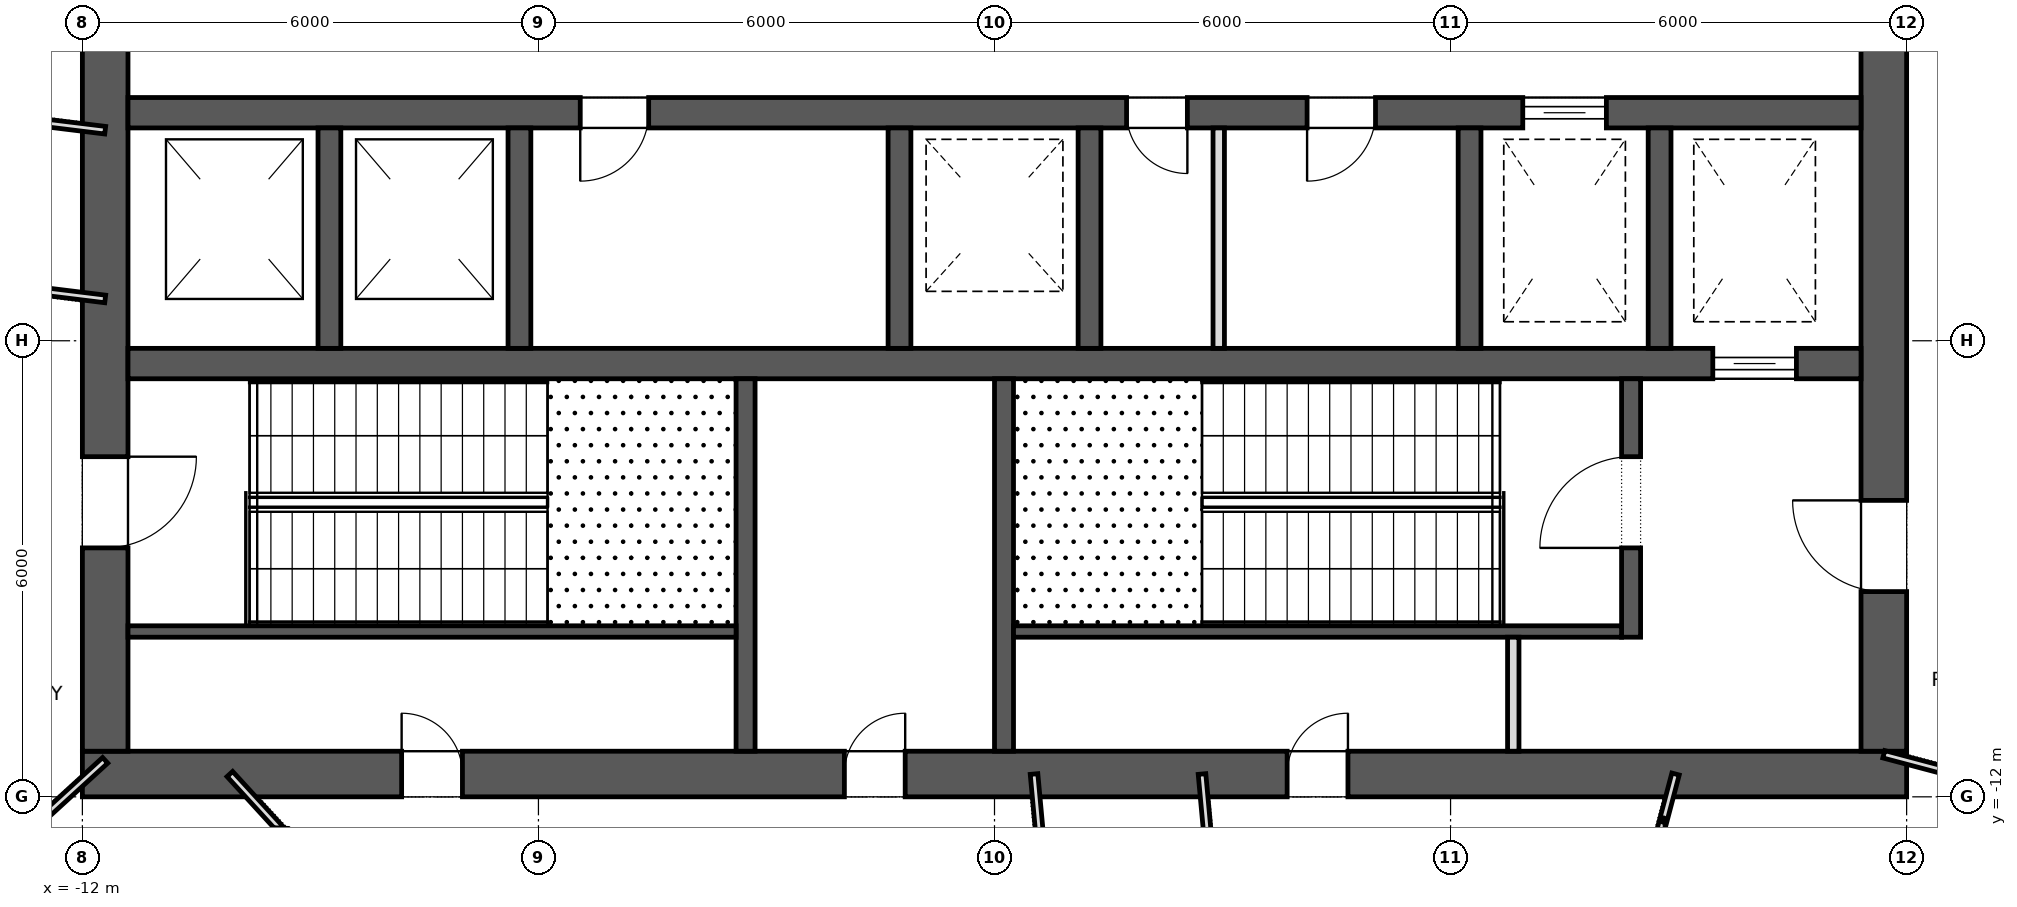
"""IFC4 building model, lengths in metres.
Left out: names, types, materials, properties, quantities, classifications, styles, units other than length and angle.
Written with IfcOpenShell. Run it as: python <this file> out.ifc"""

import sys

from ifc_helpers import new_model, si_unit, direction, frame, frame_2d, origin, place, context, subcontext, project, spatial, polyline, rectangle, outline, extrude, element, fill, save


model = new_model("IFC4")
c1 = context("Model", 3, precision=1e-05, world=origin(), true_north=direction((0.0, 1.0)))
c2 = subcontext(c1, "Body", "Model", "MODEL_VIEW")
j1 = project(units=[si_unit("LENGTHUNIT", "METRE"), si_unit("PLANEANGLEUNIT", "RADIAN")], contexts=[c1])
p1 = place(None, origin())
s1 = spatial("IfcSite", under=j1, at=p1, CompositionType="ELEMENT")
p2 = place(p1, origin())
s2 = spatial("IfcBuilding", under=s1, at=p2, CompositionType="ELEMENT")
p3 = place(p2, frame((0.0, 0.0, 328.3)))
s3 = spatial("IfcBuildingStorey", under=s2, at=p3, CompositionType="ELEMENT", Elevation=328.3)
p4 = place(p3, frame((-12.0, -11.7, 0.0), z_axis=(0.0, 0.0, 1.0), x_axis=(1.0, 0.0, 0.0)))
e1 = element("IfcWall", 1, at=p4, inside=s3, PredefinedType="SHEAR", context=c2, shape_type="SweptSolid", body=[
    extrude(rectangle(XDim=24.0, YDim=0.6, at=frame_2d((12.0, 0.0))), origin(), (0.0, 0.0, 1.0), 5.0),
])
p5 = place(p4, frame((10.025, 0.0, 0.0)))
e2 = element("IfcOpeningElement", 2, at=p5, cuts=e1, PredefinedType="OPENING", context=c2, shape_type="SweptSolid", body=[
    extrude(rectangle(XDim=0.8, YDim=2.1, at=frame_2d((0.4, 1.05))), frame((0.0, 0.312, 0.0), z_axis=(0.0, -1.0, 0.0), x_axis=(1.0, 0.0, 0.0)), (0.0, 0.0, 1.0), 0.624),
])
p6 = place(p4, frame((4.2, 0.0, 0.0)))
e3 = element("IfcOpeningElement", 3, at=p6, cuts=e1, PredefinedType="OPENING", context=c2, shape_type="SweptSolid", body=[
    extrude(rectangle(XDim=0.8, YDim=2.1, at=frame_2d((0.4, 1.05))), frame((0.0, 0.312, 0.0), z_axis=(0.0, -1.0, 0.0), x_axis=(1.0, 0.0, 0.0)), (0.0, 0.0, 1.0), 0.624),
])
p7 = place(p4, frame((15.85, 0.0, 0.0)))
e4 = element("IfcOpeningElement", 4, at=p7, cuts=e1, PredefinedType="OPENING", context=c2, shape_type="SweptSolid", body=[
    extrude(rectangle(XDim=0.8, YDim=2.1, at=frame_2d((0.4, 1.05))), frame((0.0, 0.312, 0.0), z_axis=(0.0, -1.0, 0.0), x_axis=(1.0, 0.0, 0.0)), (0.0, 0.0, 1.0), 0.624),
])
p8 = place(p3, frame((11.7, -11.4, 0.0), z_axis=(0.0, 0.0, 1.0), x_axis=(0.0, 1.0, 0.0)))
e5 = element("IfcWall", 5, at=p8, inside=s3, PredefinedType="SHEAR", context=c2, shape_type="SweptSolid", body=[
    extrude(rectangle(XDim=22.8, YDim=0.6, at=frame_2d((11.4, 0.0))), origin(), (0.0, 0.0, 1.0), 5.0),
])
p9 = place(p8, frame((10.2, 0.0, 0.0)))
e6 = element("IfcOpeningElement", 6, at=p9, cuts=e5, PredefinedType="OPENING", context=c2, shape_type="SweptSolid", body=[
    extrude(rectangle(XDim=2.4, YDim=2.1, at=frame_2d((1.2, 1.05))), frame((0.0, 0.312, 0.0), z_axis=(0.0, -1.0, 0.0), x_axis=(1.0, 0.0, 0.0)), (0.0, 0.0, 1.0), 0.624),
])
p10 = place(p8, frame((19.5, 0.0, 0.0)))
e7 = element("IfcOpeningElement", 7, at=p10, cuts=e5, PredefinedType="OPENING", context=c2, shape_type="SweptSolid", body=[
    extrude(rectangle(XDim=1.2, YDim=2.1, at=frame_2d((0.6, 1.05))), frame((0.0, 0.312, 0.0), z_axis=(0.0, -1.0, 0.0), x_axis=(1.0, 0.0, 0.0)), (0.0, 0.0, 1.0), 0.624),
])
p11 = place(p8, frame((2.1, 0.0, 0.0)))
e8 = element("IfcOpeningElement", 8, at=p11, cuts=e5, PredefinedType="OPENING", context=c2, shape_type="SweptSolid", body=[
    extrude(rectangle(XDim=1.2, YDim=2.1, at=frame_2d((0.6, 1.05))), frame((0.0, 0.312, 0.0), z_axis=(0.0, -1.0, 0.0), x_axis=(1.0, 0.0, 0.0)), (0.0, 0.0, 1.0), 0.624),
])
p12 = place(p3, frame((-11.7, -11.4, 0.0), z_axis=(0.0, 0.0, 1.0), x_axis=(0.0, 1.0, 0.0)))
e9 = element("IfcWall", 9, at=p12, inside=s3, PredefinedType="SHEAR", context=c2, shape_type="SweptSolid", body=[
    extrude(rectangle(XDim=22.8, YDim=0.6, at=frame_2d((11.4, 0.0))), origin(), (0.0, 0.0, 1.0), 5.0),
])
p13 = place(p12, frame((10.2, 0.0, 0.0)))
e10 = element("IfcOpeningElement", 10, at=p13, cuts=e9, PredefinedType="OPENING", context=c2, shape_type="SweptSolid", body=[
    extrude(rectangle(XDim=2.4, YDim=2.1, at=frame_2d((1.2, 1.05))), frame((0.0, 0.312, 0.0), z_axis=(0.0, -1.0, 0.0), x_axis=(1.0, 0.0, 0.0)), (0.0, 0.0, 1.0), 0.624),
])
p14 = place(p12, frame((18.925, 0.0, 0.0)))
e11 = element("IfcOpeningElement", 11, at=p14, cuts=e9, PredefinedType="OPENING", context=c2, shape_type="SweptSolid", body=[
    extrude(rectangle(XDim=1.2, YDim=2.1, at=frame_2d((0.6, 1.05))), frame((0.0, 0.312, 0.0), z_axis=(0.0, -1.0, 0.0), x_axis=(1.0, 0.0, 0.0)), (0.0, 0.0, 1.0), 0.624),
])
p15 = place(p12, frame((2.675, 0.0, 0.0)))
e12 = element("IfcOpeningElement", 12, at=p15, cuts=e9, PredefinedType="OPENING", context=c2, shape_type="SweptSolid", body=[
    extrude(rectangle(XDim=1.2, YDim=2.1, at=frame_2d((0.6, 1.05))), frame((0.0, 0.312, 0.0), z_axis=(0.0, -1.0, 0.0), x_axis=(1.0, 0.0, 0.0)), (0.0, 0.0, 1.0), 0.624),
])
p16 = place(p3, frame((-11.4, -3.0, 0.0), z_axis=(0.0, 0.0, 1.0), x_axis=(1.0, 0.0, 0.0)))
e13 = element("IfcWall", 13, at=p16, inside=s3, PredefinedType="SHEAR", context=c2, shape_type="SweptSolid", body=[
    extrude(rectangle(XDim=22.8, YDim=0.4, at=frame_2d((11.4, 0.0))), origin(), (0.0, 0.0, 1.0), 5.0),
])
p17 = place(p16, frame((18.35, 0.0, 0.0)))
e14 = element("IfcOpeningElement", 14, at=p17, cuts=e13, PredefinedType="OPENING", context=c2, shape_type="SweptSolid", body=[
    extrude(rectangle(XDim=1.1, YDim=2.1, at=frame_2d((0.55, 1.05))), frame((0.0, 0.212, 0.0), z_axis=(0.0, -1.0, 0.0), x_axis=(1.0, 0.0, 0.0)), (0.0, 0.0, 1.0), 0.424),
])
p18 = place(p16, frame((13.137, 0.0, 0.0)))
e15 = element("IfcOpeningElement", 15, at=p18, cuts=e13, PredefinedType="OPENING", context=c2, shape_type="SweptSolid", body=[
    extrude(rectangle(XDim=0.8, YDim=2.1, at=frame_2d((0.4, 1.05))), frame((0.0, 0.212, 0.0), z_axis=(0.0, -1.0, 0.0), x_axis=(1.0, 0.0, 0.0)), (0.0, 0.0, 1.0), 0.424),
])
p19 = place(p16, frame((15.512, 0.0, 0.0)))
e16 = element("IfcOpeningElement", 16, at=p19, cuts=e13, PredefinedType="OPENING", context=c2, shape_type="SweptSolid", body=[
    extrude(rectangle(XDim=0.9, YDim=2.1, at=frame_2d((0.45, 1.05))), frame((0.0, 0.212, 0.0), z_axis=(0.0, -1.0, 0.0), x_axis=(1.0, 0.0, 0.0)), (0.0, 0.0, 1.0), 0.424),
])
p20 = place(p16, frame((5.95, 0.0, 0.0)))
e17 = element("IfcOpeningElement", 17, at=p20, cuts=e13, PredefinedType="OPENING", context=c2, shape_type="SweptSolid", body=[
    extrude(rectangle(XDim=0.9, YDim=2.1, at=frame_2d((0.45, 1.05))), frame((0.0, 0.212, 0.0), z_axis=(0.0, -1.0, 0.0), x_axis=(1.0, 0.0, 0.0)), (0.0, 0.0, 1.0), 0.424),
])
p21 = place(p3, frame((-11.4, -6.3, 0.0), z_axis=(0.0, 0.0, 1.0), x_axis=(1.0, 0.0, 0.0)))
e18 = element("IfcWall", 18, at=p21, inside=s3, PredefinedType="SHEAR", context=c2, shape_type="SweptSolid", body=[
    extrude(rectangle(XDim=22.8, YDim=0.4, at=frame_2d((11.4, 0.0))), origin(), (0.0, 0.0, 1.0), 5.0),
])
p22 = place(p21, frame((20.85, 0.0, 0.0)))
e19 = element("IfcOpeningElement", 19, at=p22, cuts=e18, PredefinedType="OPENING", context=c2, shape_type="SweptSolid", body=[
    extrude(rectangle(XDim=1.1, YDim=2.1, at=frame_2d((0.55, 1.05))), frame((0.0, 0.212, 0.0), z_axis=(0.0, -1.0, 0.0), x_axis=(1.0, 0.0, 0.0)), (0.0, 0.0, 1.0), 0.424),
])
for number, where, z_axis, x_axis in (
    (20, (-8.75, -6.1, 0.0), (0.0, 0.0, 1.0), (0.0, 1.0, 0.0)),
    (21, (-6.25, -6.1, 0.0), (0.0, 0.0, 1.0), (0.0, 1.0, 0.0)),
    (22, (-1.25, -6.1, 0.0), (0.0, 0.0, 1.0), (0.0, 1.0, 0.0)),
    (23, (1.25, -6.1, 0.0), (0.0, 0.0, 1.0), (0.0, 1.0, 0.0)),
    (24, (6.25, -6.1, 0.0), (0.0, 0.0, 1.0), (0.0, 1.0, 0.0)),
    (25, (8.75, -6.1, 0.0), (0.0, 0.0, 1.0), (0.0, 1.0, 0.0)),
):
    element("IfcWall", number, at=place(p3, frame(where, z_axis=z_axis, x_axis=x_axis)), inside=s3, PredefinedType="SHEAR", context=c2, shape_type="SweptSolid", body=[
        extrude(rectangle(XDim=2.9, YDim=0.3, at=frame_2d((1.45, 0.0))), origin(), (0.0, 0.0, 1.0), 5.0),
    ])
for number, where, z_axis, x_axis in (
    (26, (-3.275, -11.4, 0.0), (0.0, 0.0, 1.0), (0.0, 1.0, 0.0)),
    (27, (0.125, -11.4, 0.0), (0.0, 0.0, 1.0), (0.0, 1.0, 0.0)),
):
    element("IfcWall", number, at=place(p3, frame(where, z_axis=z_axis, x_axis=x_axis)), inside=s3, PredefinedType="SHEAR", context=c2, shape_type="SweptSolid", body=[
        extrude(rectangle(XDim=4.9, YDim=0.25, at=frame_2d((2.45, 0.0))), origin(), (0.0, 0.0, 1.0), 4.65),
    ])
p23 = place(p3, frame((8.375, -9.9, 0.0), z_axis=(0.0, 0.0, 1.0), x_axis=(0.0, 1.0, 0.0)))
e28 = element("IfcWall", 28, at=p23, inside=s3, PredefinedType="SHEAR", context=c2, shape_type="SweptSolid", body=[
    extrude(rectangle(XDim=3.4, YDim=0.25, at=frame_2d((1.7, 0.0))), origin(), (0.0, 0.0, 1.0), 4.65),
])
p24 = place(p23, frame((1.175, 0.0, 0.0)))
e29 = element("IfcOpeningElement", 29, at=p24, cuts=e28, PredefinedType="OPENING", context=c2, shape_type="SweptSolid", body=[
    extrude(rectangle(XDim=1.2, YDim=2.1, at=frame_2d((0.6, 1.05))), frame((0.0, 0.137, 0.0), z_axis=(0.0, -1.0, 0.0), x_axis=(1.0, 0.0, 0.0)), (0.0, 0.0, 1.0), 0.274),
])
for number, where, z_axis, x_axis in (
    (30, (-11.4, -9.825, 0.0), (0.0, 0.0, 1.0), (1.0, 0.0, 0.0)),
    (31, (0.25, -9.825, 0.0), (0.0, 0.0, 1.0), (1.0, 0.0, 0.0)),
):
    element("IfcWall", number, at=place(p3, frame(where, z_axis=z_axis, x_axis=x_axis)), inside=s3, PredefinedType="SHEAR", context=c2, shape_type="SweptSolid", body=[
        extrude(rectangle(XDim=8.0, YDim=0.15, at=frame_2d((4.0, 0.0))), origin(), (0.0, 0.0, 1.0), 4.65),
    ])
p25 = place(p3, frame((6.825, -11.4, 0.0), z_axis=(0.0, 0.0, 1.0), x_axis=(0.0, 1.0, 0.0)))
e32 = element("IfcWall", 32, at=p25, inside=s3, PredefinedType="PARTITIONING", context=c2, shape_type="SweptSolid", body=[
    extrude(rectangle(XDim=1.5, YDim=0.15, at=frame_2d((0.75, 0.0))), origin(), (0.0, 0.0, 1.0), 4.65),
])
p26 = place(p3, frame((2.95, -6.1, 0.0), z_axis=(0.0, 0.0, 1.0), x_axis=(0.0, 1.0, 0.0)))
e33 = element("IfcWall", 33, at=p26, inside=s3, PredefinedType="PARTITIONING", context=c2, shape_type="SweptSolid", body=[
    extrude(rectangle(XDim=2.9, YDim=0.15, at=frame_2d((1.45, 0.0))), origin(), (0.0, 0.0, 1.0), 4.65),
])
p27 = place(p3, frame((-25.235, -3.784, 0.0), z_axis=(0.0, 0.0, 1.0), x_axis=(0.992511578582, -0.122150588948, 0.0)))
e34 = element("IfcWall", 34, at=p27, inside=s3, PredefinedType="PARTITIONING", context=c2, shape_type="SweptSolid", body=[
    extrude(outline(polyline([(0.063, -0.05), (1.852, -0.05), (3.64, -0.05), (5.429, -0.05), (7.218, -0.05), (9.007, -0.05), (10.795, -0.05), (10.797, -0.05), (10.797, -0.05), (12.217, -0.05), (13.637, -0.05), (13.637, 0.05), (11.689, 0.05), (9.741, 0.05), (7.792, 0.05), (5.844, 0.05), (3.896, 0.05), (1.948, 0.05), (0.0, 0.05), (0.0, 0.049), (0.011, 0.017), (0.035, 0.026), (0.063, -0.05)])), origin(), (0.0, 0.0, 1.0), 4.65),
])
p28 = place(p3, frame((-16.898, -16.272, 0.0), z_axis=(0.0, 0.0, 1.0), x_axis=(0.738080105563, 0.674713092931, 0.0)))
e35 = element("IfcWall", 35, at=p28, inside=s3, PredefinedType="PARTITIONING", context=c2, shape_type="SweptSolid", body=[
    extrude(outline(polyline([(7.043, 0.05), (5.152, 0.05), (3.261, 0.05), (3.259, 0.048), (3.257, 0.05), (1.635, 0.05), (0.013, 0.05), (0.018, 0.009), (0.0, 0.007), (0.0, -0.05), (1.761, -0.05), (3.521, -0.05), (5.282, -0.05), (7.043, -0.05), (7.043, 0.05)])), origin(), (0.0, 0.0, 1.0), 4.65),
])
p29 = place(p3, frame((-9.376, -12.447, 0.0), z_axis=(0.0, 0.0, 1.0), x_axis=(-0.67520050009, 0.73763424858, 0.0)))
e36 = element("IfcWall", 36, at=p29, inside=s3, PredefinedType="PARTITIONING", context=c2, shape_type="SweptSolid", body=[
    extrude(outline(polyline([(1.013, 0.05), (0.1, 0.05), (0.0, -0.05), (1.013, -0.05), (1.013, 0.05)])), origin(), (0.0, 0.0, 1.0), 4.65),
])
p30 = place(p3, frame((0.52, -11.7, 0.0), z_axis=(0.0, 0.0, 1.0), x_axis=(0.091437926601, -0.995810777999, 0.0)))
e37 = element("IfcWall", 37, at=p30, inside=s3, PredefinedType="PARTITIONING", context=c2, shape_type="SweptSolid", body=[
    extrude(outline(polyline([(0.0, -0.05), (1.416, -0.05), (2.832, -0.05), (2.833, -0.049), (2.842, -0.05), (4.599, -0.05), (6.357, -0.05), (8.114, -0.05), (9.872, -0.05), (9.877, 0.007), (9.902, 0.005), (9.906, 0.046), (9.906, 0.05), (7.925, 0.05), (5.943, 0.05), (3.962, 0.05), (1.981, 0.05), (0.0, 0.05), (0.0, -0.05)])), origin(), (0.0, 0.0, 1.0), 4.65),
])
p31 = place(p3, frame((2.73, -11.7, 0.0), z_axis=(0.0, 0.0, 1.0), x_axis=(0.091085808065, -0.995843047658, 0.0)))
e38 = element("IfcWall", 38, at=p31, inside=s3, PredefinedType="PARTITIONING", context=c2, shape_type="SweptSolid", body=[
    extrude(outline(polyline([(9.724, -0.05), (9.724, -0.05), (9.721, -0.004), (9.696, -0.006), (9.691, 0.05), (7.753, 0.05), (5.815, 0.05), (3.877, 0.05), (1.938, 0.05), (0.0, 0.05), (0.0, -0.05), (1.945, -0.05), (3.89, -0.05), (5.835, -0.05), (7.78, -0.05), (9.724, -0.05)])), origin(), (0.0, 0.0, 1.0), 4.65),
])
p32 = place(p3, frame((8.96, -11.7, 0.0), z_axis=(0.0, 0.0, 1.0), x_axis=(-0.255665703413, -0.966765249737, 0.0)))
e39 = element("IfcWall", 39, at=p32, inside=s3, PredefinedType="PARTITIONING", context=c2, shape_type="SweptSolid", body=[
    extrude(outline(polyline([(1.302, -0.05), (1.302, -0.05), (1.202, 0.05), (0.0, 0.05), (0.0, -0.05), (1.302, -0.05)])), origin(), (0.0, 0.0, 1.0), 4.65),
])
p33 = place(p3, frame((11.7, -11.44, 0.0), z_axis=(0.0, 0.0, 1.0), x_axis=(0.966559990697, -0.256440605959, 0.0)))
e40 = element("IfcWall", 40, at=p33, inside=s3, PredefinedType="PARTITIONING", context=c2, shape_type="SweptSolid", body=[
    extrude(rectangle(XDim=8.668, YDim=0.1, at=frame_2d((4.334, 0.0))), origin(), (0.0, 0.0, 1.0), 4.65),
])
p34 = place(p3, frame((-21.629, -2.014, 0.0), z_axis=(0.0, 0.0, 1.0), x_axis=(0.992580859713, -0.121586335302, 0.0)))
e41 = element("IfcWall", 41, at=p34, inside=s3, PredefinedType="PARTITIONING", context=c2, shape_type="SweptSolid", body=[
    extrude(outline(polyline([(0.0, 0.05), (0.0, -0.05), (1.667, -0.05), (3.334, -0.05), (5.002, -0.05), (6.669, -0.05), (8.336, -0.05), (10.004, -0.05), (10.004, 0.05), (8.336, 0.05), (6.669, 0.05), (5.002, 0.05), (3.334, 0.05), (1.667, 0.05), (0.0, 0.05)])), origin(), (0.0, 0.0, 1.0), 4.65),
])
p35 = place(p22, origin())
e42 = element("IfcDoor", 42, at=p35, inside=s3, OperationType="SLIDING_TO_LEFT", PredefinedType="DOOR", context=c2, shape_type="SweptSolid", body=[
    extrude(rectangle(XDim=1.1, YDim=2.1, at=frame_2d((0.55, 1.05))), frame((0.0, 0.025, 0.0), z_axis=(0.0, -1.0, 0.0), x_axis=(1.0, 0.0, 0.0)), (0.0, 0.0, 1.0), 0.05),
])
fill(e19, e42)
p36 = place(p17, origin())
e43 = element("IfcDoor", 43, at=p36, inside=s3, OperationType="SLIDING_TO_LEFT", PredefinedType="DOOR", context=c2, shape_type="SweptSolid", body=[
    extrude(rectangle(XDim=1.1, YDim=2.1, at=frame_2d((0.55, 1.05))), frame((0.0, 0.025, 0.0), z_axis=(0.0, -1.0, 0.0), x_axis=(1.0, 0.0, 0.0)), (0.0, 0.0, 1.0), 0.05),
])
fill(e14, e43)
p37 = place(p15, frame((1.2, 0.0, 0.0), z_axis=(0.0, 0.0, 1.0), x_axis=(-1.0, 0.0, 0.0)))
e44 = element("IfcDoor", 44, at=p37, inside=s3, OperationType="SINGLE_SWING_RIGHT", PredefinedType="DOOR", context=c2, shape_type="SweptSolid", body=[
    extrude(rectangle(XDim=1.2, YDim=2.1, at=frame_2d((0.6, 1.05))), frame((0.0, 0.025, 0.0), z_axis=(0.0, -1.0, 0.0), x_axis=(1.0, 0.0, 0.0)), (0.0, 0.0, 1.0), 0.05),
])
fill(e12, e44)
p38 = place(p24, origin())
e45 = element("IfcDoor", 45, at=p38, inside=s3, OperationType="SINGLE_SWING_RIGHT", PredefinedType="DOOR", context=c2, shape_type="SweptSolid", body=[
    extrude(rectangle(XDim=1.2, YDim=2.1, at=frame_2d((0.6, 1.05))), frame((0.0, 0.025, 0.0), z_axis=(0.0, -1.0, 0.0), x_axis=(1.0, 0.0, 0.0)), (0.0, 0.0, 1.0), 0.05),
])
fill(e29, e45)
p39 = place(p11, origin())
e46 = element("IfcDoor", 46, at=p39, inside=s3, OperationType="SINGLE_SWING_LEFT", PredefinedType="DOOR", context=c2, shape_type="SweptSolid", body=[
    extrude(rectangle(XDim=1.2, YDim=2.1, at=frame_2d((0.6, 1.05))), frame((0.0, 0.025, 0.0), z_axis=(0.0, -1.0, 0.0), x_axis=(1.0, 0.0, 0.0)), (0.0, 0.0, 1.0), 0.05),
])
fill(e8, e46)
p40 = place(p5, origin())
e47 = element("IfcDoor", 47, at=p40, inside=s3, OperationType="SINGLE_SWING_LEFT", PredefinedType="DOOR", context=c2, shape_type="SweptSolid", body=[
    extrude(rectangle(XDim=0.8, YDim=2.1, at=frame_2d((0.4, 1.05))), frame((0.0, 0.025, 0.0), z_axis=(0.0, -1.0, 0.0), x_axis=(1.0, 0.0, 0.0)), (0.0, 0.0, 1.0), 0.05),
])
fill(e2, e47)
p41 = place(p6, origin())
e48 = element("IfcDoor", 48, at=p41, inside=s3, OperationType="SINGLE_SWING_RIGHT", PredefinedType="DOOR", context=c2, shape_type="SweptSolid", body=[
    extrude(rectangle(XDim=0.8, YDim=2.1, at=frame_2d((0.4, 1.05))), frame((0.0, 0.025, 0.0), z_axis=(0.0, -1.0, 0.0), x_axis=(1.0, 0.0, 0.0)), (0.0, 0.0, 1.0), 0.05),
])
fill(e3, e48)
p42 = place(p7, origin())
e49 = element("IfcDoor", 49, at=p42, inside=s3, OperationType="SINGLE_SWING_LEFT", PredefinedType="DOOR", context=c2, shape_type="SweptSolid", body=[
    extrude(rectangle(XDim=0.8, YDim=2.1, at=frame_2d((0.4, 1.05))), frame((0.0, 0.025, 0.0), z_axis=(0.0, -1.0, 0.0), x_axis=(1.0, 0.0, 0.0)), (0.0, 0.0, 1.0), 0.05),
])
fill(e4, e49)
p43 = place(p18, frame((0.8, 0.0, 0.0), z_axis=(0.0, 0.0, 1.0), x_axis=(-1.0, 0.0, 0.0)))
e50 = element("IfcDoor", 50, at=p43, inside=s3, OperationType="SINGLE_SWING_RIGHT", PredefinedType="DOOR", context=c2, shape_type="SweptSolid", body=[
    extrude(rectangle(XDim=0.8, YDim=2.1, at=frame_2d((0.4, 1.05))), frame((0.0, 0.025, 0.0), z_axis=(0.0, -1.0, 0.0), x_axis=(1.0, 0.0, 0.0)), (0.0, 0.0, 1.0), 0.05),
])
fill(e15, e50)
p44 = place(p19, frame((0.9, 0.0, 0.0), z_axis=(0.0, 0.0, 1.0), x_axis=(-1.0, 0.0, 0.0)))
e51 = element("IfcDoor", 51, at=p44, inside=s3, OperationType="SINGLE_SWING_LEFT", PredefinedType="DOOR", context=c2, shape_type="SweptSolid", body=[
    extrude(rectangle(XDim=0.9, YDim=2.1, at=frame_2d((0.45, 1.05))), frame((0.0, 0.025, 0.0), z_axis=(0.0, -1.0, 0.0), x_axis=(1.0, 0.0, 0.0)), (0.0, 0.0, 1.0), 0.05),
])
fill(e16, e51)
p45 = place(p20, frame((0.9, 0.0, 0.0), z_axis=(0.0, 0.0, 1.0), x_axis=(-1.0, 0.0, 0.0)))
e52 = element("IfcDoor", 52, at=p45, inside=s3, OperationType="SINGLE_SWING_LEFT", PredefinedType="DOOR", context=c2, shape_type="SweptSolid", body=[
    extrude(rectangle(XDim=0.9, YDim=2.1, at=frame_2d((0.45, 1.05))), frame((0.0, 0.025, 0.0), z_axis=(0.0, -1.0, 0.0), x_axis=(1.0, 0.0, 0.0)), (0.0, 0.0, 1.0), 0.05),
])
fill(e17, e52)
save(model, sys.argv[1])
